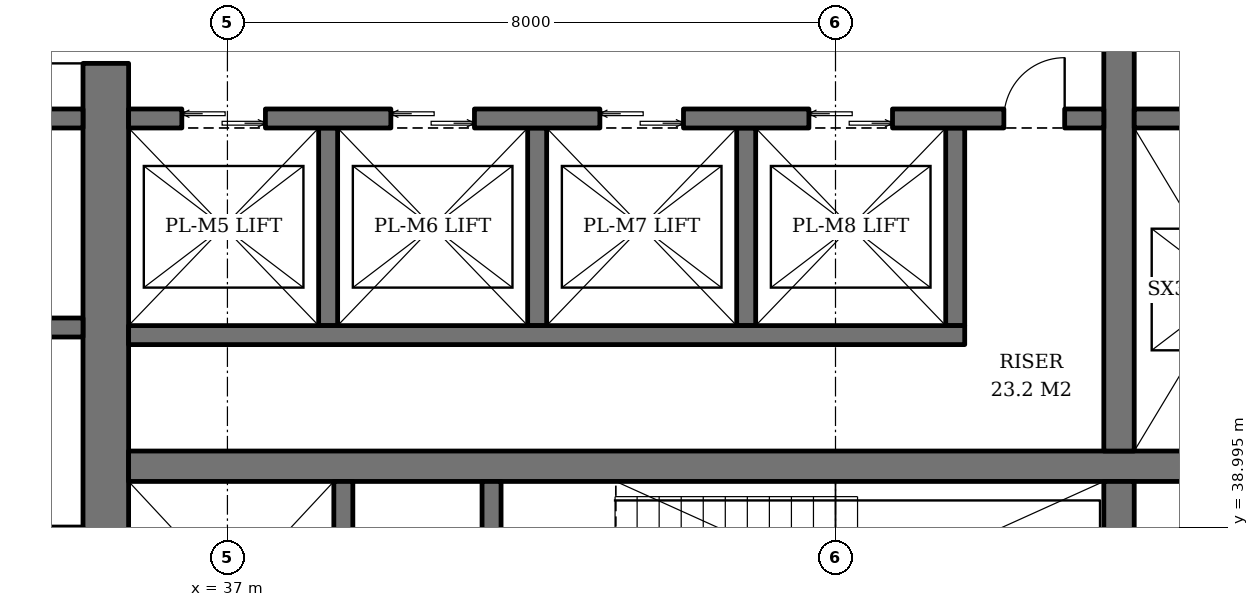
"""IFC4 building model, lengths in metres.
Left out: names, types, materials, properties, quantities, classifications, styles, units other than length and angle.
Written with IfcOpenShell. Run it as: python <this file> out.ifc"""

import sys

from ifc_helpers import new_model, si_unit, direction, frame, frame_2d, origin, place, context, subcontext, project, spatial, rectangle, extrude, element, fill, save


model = new_model("IFC4")
c1 = context("Model", 3, precision=1e-05, world=origin(), true_north=direction((0.0, 1.0)))
c2 = subcontext(c1, "Body", "Model", "MODEL_VIEW")
j1 = project(units=[si_unit("LENGTHUNIT", "METRE"), si_unit("PLANEANGLEUNIT", "RADIAN")], contexts=[c1])
p1 = place(None, origin())
s1 = spatial("IfcSite", under=j1, at=p1, CompositionType="ELEMENT")
p2 = place(p1, origin())
s2 = spatial("IfcBuilding", under=s1, at=p2, CompositionType="ELEMENT")
p3 = place(p2, frame((0.0, 0.0, 108.4)))
s3 = spatial("IfcBuildingStorey", under=s2, at=p3, CompositionType="ELEMENT", Elevation=108.4)
p4 = place(p3, frame((35.4, 36.7, 0.0), z_axis=(0.0, 0.0, 1.0), x_axis=(0.0, 1.0, 0.0)))
e1 = element("IfcWall", 1, at=p4, inside=s3, PredefinedType="SHEAR", context=c2, shape_type="SweptSolid", body=[
    extrude(rectangle(XDim=18.6, YDim=0.6, at=frame_2d((9.3, 0.0))), origin(), (0.0, 0.0, 1.0), 3.8),
])
p5 = place(p4, frame((8.4, 0.0, 0.0)))
e2 = element("IfcOpeningElement", 2, at=p5, cuts=e1, PredefinedType="OPENING", context=c2, shape_type="SweptSolid", body=[
    extrude(rectangle(XDim=1.8, YDim=2.4, at=frame_2d((0.9, 1.2))), frame((0.0, 0.31, 0.0), z_axis=(0.0, -1.0, 0.0), x_axis=(1.0, 0.0, 0.0)), (0.0, 0.0, 1.0), 0.62),
])
p6 = place(p3, frame((35.7, 39.8, 0.0), z_axis=(0.0, 0.0, 1.0), x_axis=(1.0, 0.0, 0.0)))
e3 = element("IfcWall", 3, at=p6, inside=s3, PredefinedType="SHEAR", context=c2, shape_type="SweptSolid", body=[
    extrude(rectangle(XDim=18.6, YDim=0.4, at=frame_2d((9.3, 0.0))), origin(), (0.0, 0.0, 1.0), 3.8),
])
p7 = place(p3, frame((48.73, 36.7, 0.0), z_axis=(0.0, 0.0, 1.0), x_axis=(0.0, 1.0, 0.0)))
e4 = element("IfcWall", 4, at=p7, inside=s3, PredefinedType="SHEAR", context=c2, shape_type="SweptSolid", body=[
    extrude(rectangle(XDim=2.9, YDim=0.4, at=frame_2d((1.45, 0.0))), origin(), (0.0, 0.0, 1.0), 3.8),
])
p8 = place(p3, frame((48.73, 40.0, 0.0), z_axis=(0.0, 0.0, 1.0), x_axis=(0.0, 1.0, 0.0)))
e5 = element("IfcWall", 5, at=p8, inside=s3, PredefinedType="SHEAR", context=c2, shape_type="SweptSolid", body=[
    extrude(rectangle(XDim=12.0, YDim=0.4, at=frame_2d((6.0, 0.0))), origin(), (0.0, 0.0, 1.0), 3.8),
])
p9 = place(p3, frame((38.525, 36.7, 0.0), z_axis=(0.0, 0.0, 1.0), x_axis=(0.0, 1.0, 0.0)))
e6 = element("IfcWall", 6, at=p9, inside=s3, PredefinedType="SHEAR", context=c2, shape_type="SweptSolid", body=[
    extrude(rectangle(XDim=2.9, YDim=0.25, at=frame_2d((1.45, 0.0))), origin(), (0.0, 0.0, 1.0), 3.8),
])
p10 = place(p9, frame((0.8, 0.0, 0.0)))
e7 = element("IfcOpeningElement", 7, at=p10, cuts=e6, PredefinedType="OPENING", context=c2, shape_type="SweptSolid", body=[
    extrude(rectangle(XDim=1.3, YDim=2.2, at=frame_2d((0.65, 1.1))), frame((0.0, 0.135, 0.0), z_axis=(0.0, -1.0, 0.0), x_axis=(1.0, 0.0, 0.0)), (0.0, 0.0, 1.0), 0.27),
])
p11 = place(p3, frame((40.475, 36.7, 0.0), z_axis=(0.0, 0.0, 1.0), x_axis=(0.0, 1.0, 0.0)))
e8 = element("IfcWall", 8, at=p11, inside=s3, PredefinedType="SHEAR", context=c2, shape_type="SweptSolid", body=[
    extrude(rectangle(XDim=2.9, YDim=0.25, at=frame_2d((1.45, 0.0))), origin(), (0.0, 0.0, 1.0), 3.8),
])
p12 = place(p11, frame((0.75, 0.0, 0.0)))
e9 = element("IfcOpeningElement", 9, at=p12, cuts=e8, PredefinedType="OPENING", context=c2, shape_type="SweptSolid", body=[
    extrude(rectangle(XDim=1.2, YDim=2.1, at=frame_2d((0.6, 1.05))), frame((0.0, 0.135, 0.0), z_axis=(0.0, -1.0, 0.0), x_axis=(1.0, 0.0, 0.0)), (0.0, 0.0, 1.0), 0.27),
])
for number, where, z_axis, x_axis in (
    (10, (38.325, 44.25, 0.0), (0.0, 0.0, 1.0), (0.0, -1.0, 0.0)),
    (11, (41.075, 44.25, 0.0), (0.0, 0.0, 1.0), (0.0, -1.0, 0.0)),
    (12, (43.825, 44.25, 0.0), (0.0, 0.0, 1.0), (0.0, -1.0, 0.0)),
    (13, (46.575, 44.25, 0.0), (0.0, 0.0, 1.0), (0.0, -1.0, 0.0)),
):
    element("IfcWall", number, at=place(p3, frame(where, z_axis=z_axis, x_axis=x_axis)), inside=s3, PredefinedType="SHEAR", context=c2, shape_type="SweptSolid", body=[
        extrude(rectangle(XDim=2.6, YDim=0.25, at=frame_2d((1.3, 0.0))), origin(), (0.0, 0.0, 1.0), 3.8),
    ])
p13 = place(p3, frame((35.7, 41.525, 0.0), z_axis=(0.0, 0.0, 1.0), x_axis=(1.0, 0.0, 0.0)))
e14 = element("IfcWall", 14, at=p13, inside=s3, PredefinedType="SHEAR", context=c2, shape_type="SweptSolid", body=[
    extrude(rectangle(XDim=11.0, YDim=0.25, at=frame_2d((5.5, 0.0))), origin(), (0.0, 0.0, 1.0), 3.8),
])
p14 = place(p3, frame((35.7, 44.375, 0.0), z_axis=(0.0, 0.0, 1.0), x_axis=(1.0, 0.0, 0.0)))
e15 = element("IfcWall", 15, at=p14, inside=s3, PredefinedType="SHEAR", context=c2, shape_type="SweptSolid", body=[
    extrude(rectangle(XDim=12.83, YDim=0.25, at=frame_2d((6.415, 0.0))), origin(), (0.0, 0.0, 1.0), 3.8),
])
p15 = place(p14, frame((0.7, 0.0, 0.0)))
e16 = element("IfcOpeningElement", 16, at=p15, cuts=e15, PredefinedType="OPENING", context=c2, shape_type="SweptSolid", body=[
    extrude(rectangle(XDim=1.1, YDim=2.2, at=frame_2d((0.55, 1.1))), frame((0.0, 0.135, 0.0), z_axis=(0.0, -1.0, 0.0), x_axis=(1.0, 0.0, 0.0)), (0.0, 0.0, 1.0), 0.27),
])
p16 = place(p14, frame((3.45, 0.0, 0.0)))
e17 = element("IfcOpeningElement", 17, at=p16, cuts=e15, PredefinedType="OPENING", context=c2, shape_type="SweptSolid", body=[
    extrude(rectangle(XDim=1.1, YDim=2.2, at=frame_2d((0.55, 1.1))), frame((0.0, 0.135, 0.0), z_axis=(0.0, -1.0, 0.0), x_axis=(1.0, 0.0, 0.0)), (0.0, 0.0, 1.0), 0.27),
])
p17 = place(p14, frame((6.2, 0.0, 0.0)))
e18 = element("IfcOpeningElement", 18, at=p17, cuts=e15, PredefinedType="OPENING", context=c2, shape_type="SweptSolid", body=[
    extrude(rectangle(XDim=1.1, YDim=2.2, at=frame_2d((0.55, 1.1))), frame((0.0, 0.135, 0.0), z_axis=(0.0, -1.0, 0.0), x_axis=(1.0, 0.0, 0.0)), (0.0, 0.0, 1.0), 0.27),
])
p18 = place(p14, frame((8.95, 0.0, 0.0)))
e19 = element("IfcOpeningElement", 19, at=p18, cuts=e15, PredefinedType="OPENING", context=c2, shape_type="SweptSolid", body=[
    extrude(rectangle(XDim=1.1, YDim=2.2, at=frame_2d((0.55, 1.1))), frame((0.0, 0.135, 0.0), z_axis=(0.0, -1.0, 0.0), x_axis=(1.0, 0.0, 0.0)), (0.0, 0.0, 1.0), 0.27),
])
p19 = place(p14, frame((11.515, 0.0, 0.0)))
e20 = element("IfcOpeningElement", 20, at=p19, cuts=e15, PredefinedType="OPENING", context=c2, shape_type="SweptSolid", body=[
    extrude(rectangle(XDim=0.8, YDim=2.0, at=frame_2d((0.4, 1.0))), frame((0.0, 0.135, 0.0), z_axis=(0.0, -1.0, 0.0), x_axis=(1.0, 0.0, 0.0)), (0.0, 0.0, 1.0), 0.27),
])
p20 = place(p3, frame((48.93, 44.375, 0.0), z_axis=(0.0, 0.0, 1.0), x_axis=(1.0, 0.0, 0.0)))
e21 = element("IfcWall", 21, at=p20, inside=s3, PredefinedType="SHEAR", context=c2, shape_type="SweptSolid", body=[
    extrude(rectangle(XDim=5.37, YDim=0.25, at=frame_2d((2.685, 0.0))), origin(), (0.0, 0.0, 1.0), 3.8),
])
for number, where, z_axis, x_axis in (
    (22, (32.4, 41.625, 0.0), (0.0, 0.0, 1.0), (1.0, 0.0, 0.0)),
    (23, (32.4, 44.375, 0.0), (0.0, 0.0, 1.0), (1.0, 0.0, 0.0)),
):
    element("IfcWall", number, at=place(p3, frame(where, z_axis=z_axis, x_axis=x_axis)), inside=s3, PredefinedType="SHEAR", context=c2, shape_type="SweptSolid", body=[
        extrude(rectangle(XDim=2.7, YDim=0.25, at=frame_2d((1.35, 0.0))), origin(), (0.0, 0.0, 1.0), 3.8),
    ])
p21 = place(p15, origin())
e24 = element("IfcDoor", 24, at=p21, inside=s3, OperationType="DOUBLE_DOOR_SLIDING", PredefinedType="DOOR", context=c2, shape_type="SweptSolid", body=[
    extrude(rectangle(XDim=1.1, YDim=2.2, at=frame_2d((0.55, 1.1))), frame((0.0, 0.025, 0.0), z_axis=(0.0, -1.0, 0.0), x_axis=(1.0, 0.0, 0.0)), (0.0, 0.0, 1.0), 0.05),
])
fill(e16, e24)
p22 = place(p16, origin())
e25 = element("IfcDoor", 25, at=p22, inside=s3, OperationType="DOUBLE_DOOR_SLIDING", PredefinedType="DOOR", context=c2, shape_type="SweptSolid", body=[
    extrude(rectangle(XDim=1.1, YDim=2.2, at=frame_2d((0.55, 1.1))), frame((0.0, 0.025, 0.0), z_axis=(0.0, -1.0, 0.0), x_axis=(1.0, 0.0, 0.0)), (0.0, 0.0, 1.0), 0.05),
])
fill(e17, e25)
p23 = place(p17, origin())
e26 = element("IfcDoor", 26, at=p23, inside=s3, OperationType="DOUBLE_DOOR_SLIDING", PredefinedType="DOOR", context=c2, shape_type="SweptSolid", body=[
    extrude(rectangle(XDim=1.1, YDim=2.2, at=frame_2d((0.55, 1.1))), frame((0.0, 0.025, 0.0), z_axis=(0.0, -1.0, 0.0), x_axis=(1.0, 0.0, 0.0)), (0.0, 0.0, 1.0), 0.05),
])
fill(e18, e26)
p24 = place(p18, origin())
e27 = element("IfcDoor", 27, at=p24, inside=s3, OperationType="DOUBLE_DOOR_SLIDING", PredefinedType="DOOR", context=c2, shape_type="SweptSolid", body=[
    extrude(rectangle(XDim=1.1, YDim=2.2, at=frame_2d((0.55, 1.1))), frame((0.0, 0.025, 0.0), z_axis=(0.0, -1.0, 0.0), x_axis=(1.0, 0.0, 0.0)), (0.0, 0.0, 1.0), 0.05),
])
fill(e19, e27)
p25 = place(p19, origin())
e28 = element("IfcDoor", 28, at=p25, inside=s3, OperationType="SINGLE_SWING_RIGHT", PredefinedType="DOOR", context=c2, shape_type="SweptSolid", body=[
    extrude(rectangle(XDim=0.8, YDim=2.0, at=frame_2d((0.4, 1.0))), frame((0.0, 0.025, 0.0), z_axis=(0.0, -1.0, 0.0), x_axis=(1.0, 0.0, 0.0)), (0.0, 0.0, 1.0), 0.05),
])
fill(e20, e28)
p26 = place(p5, origin())
e29 = element("IfcDoor", 29, at=p26, inside=s3, OperationType="DOUBLE_DOOR_SINGLE_SWING", PredefinedType="DOOR", context=c2, shape_type="SweptSolid", body=[
    extrude(rectangle(XDim=1.8, YDim=2.4, at=frame_2d((0.9, 1.2))), frame((0.0, 0.025, 0.0), z_axis=(0.0, -1.0, 0.0), x_axis=(1.0, 0.0, 0.0)), (0.0, 0.0, 1.0), 0.05),
])
fill(e2, e29)
save(model, sys.argv[1])
